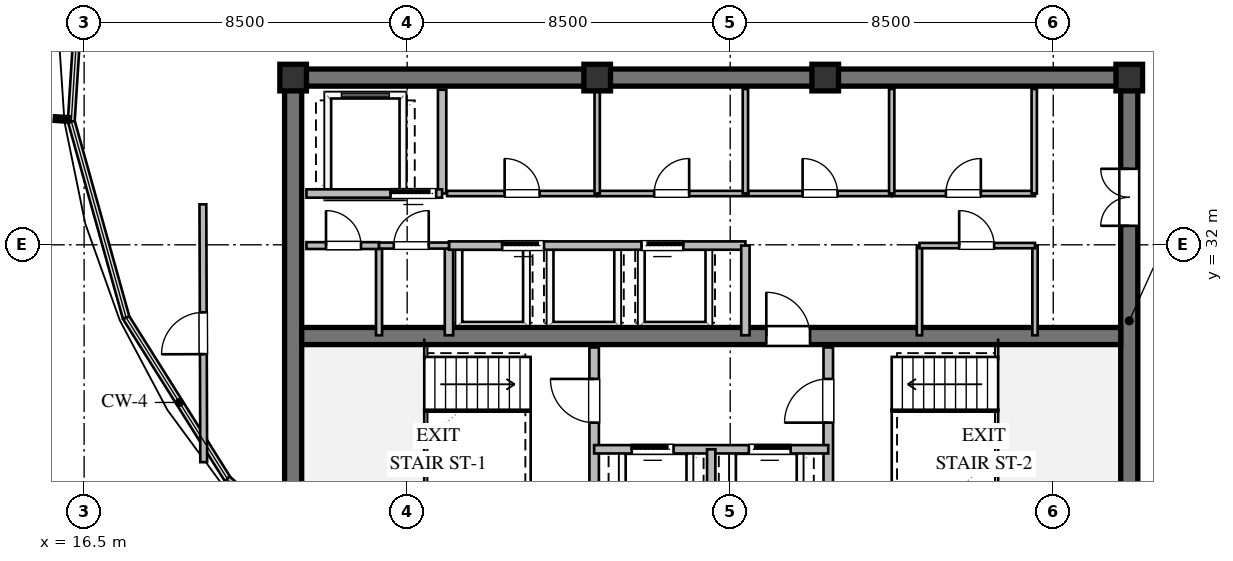
"""IFC4 building model, lengths in metres.
Left out: names, types, materials, properties, quantities, classifications, styles, units other than length and angle.
Written with IfcOpenShell. Run it as: python <this file> out.ifc"""

import sys

from ifc_helpers import new_model, si_unit, direction, frame, frame_2d, origin, origin_2d, place, context, subcontext, project, spatial, rectangle, extrude, element, fill, save


model = new_model("IFC4")
c1 = context("Model", 3, precision=1e-05, world=origin(), true_north=direction((0.0, 1.0)))
c2 = subcontext(c1, "Body", "Model", "MODEL_VIEW")
j1 = project(units=[si_unit("LENGTHUNIT", "METRE"), si_unit("PLANEANGLEUNIT", "RADIAN")], contexts=[c1])
p1 = place(None, origin())
s1 = spatial("IfcSite", under=j1, at=p1, CompositionType="ELEMENT")
p2 = place(p1, origin())
s2 = spatial("IfcBuilding", under=s1, at=p2, CompositionType="ELEMENT")
p3 = place(p2, frame((0.0, 0.0, 262.4)))
s3 = spatial("IfcBuildingStorey", under=s2, at=p3, CompositionType="ELEMENT", Elevation=262.4)
p4 = place(p3, frame((21.775, 36.4, 0.0), z_axis=(0.0, 0.0, 1.0), x_axis=(1.0, 0.0, 0.0)))
e1 = element("IfcWall", 1, at=p4, inside=s3, PredefinedType="SHEAR", context=c2, shape_type="SweptSolid", body=[
    extrude(rectangle(XDim=22.45, YDim=0.45, at=frame_2d((11.225, 0.0))), origin(), (0.0, 0.0, 1.0), 3.56),
])
p5 = place(p3, frame((22.0, 23.825, 0.0), z_axis=(0.0, 0.0, 1.0), x_axis=(0.0, 1.0, 0.0)))
e2 = element("IfcWall", 2, at=p5, inside=s3, PredefinedType="SHEAR", context=c2, shape_type="SweptSolid", body=[
    extrude(rectangle(XDim=12.35, YDim=0.45, at=frame_2d((6.175, 0.0))), origin(), (0.0, 0.0, 1.0), 3.56),
])
p6 = place(p3, frame((44.0, 23.825, 0.0), z_axis=(0.0, 0.0, 1.0), x_axis=(0.0, 1.0, 0.0)))
e3 = element("IfcWall", 3, at=p6, inside=s3, PredefinedType="SHEAR", context=c2, shape_type="SweptSolid", body=[
    extrude(rectangle(XDim=12.35, YDim=0.45, at=frame_2d((6.175, 0.0))), origin(), (0.0, 0.0, 1.0), 3.56),
])
p7 = place(p6, frame((8.675, 0.0, 0.0)))
e4 = element("IfcOpeningElement", 4, at=p7, cuts=e3, PredefinedType="OPENING", context=c2, shape_type="SweptSolid", body=[
    extrude(rectangle(XDim=1.5, YDim=2.15, at=frame_2d((0.75, 1.075))), frame((0.0, 0.235, 0.0), z_axis=(0.0, -1.0, 0.0), x_axis=(1.0, 0.0, 0.0)), (0.0, 0.0, 1.0), 0.47),
])
p8 = place(p3, frame((22.225, 29.6, 0.0), z_axis=(0.0, 0.0, 1.0), x_axis=(1.0, 0.0, 0.0)))
e5 = element("IfcWall", 5, at=p8, inside=s3, PredefinedType="SHEAR", context=c2, shape_type="SweptSolid", body=[
    extrude(rectangle(XDim=21.55, YDim=0.45, at=frame_2d((10.775, 0.0))), origin(), (0.0, 0.0, 1.0), 3.56),
])
p9 = place(p8, frame((12.225, 0.0, 0.0)))
e6 = element("IfcOpeningElement", 6, at=p9, cuts=e5, PredefinedType="OPENING", context=c2, shape_type="SweptSolid", body=[
    extrude(rectangle(XDim=1.15, YDim=2.1, at=frame_2d((0.575, 1.05))), frame((0.0, 0.235, 0.0), z_axis=(0.0, -1.0, 0.0), x_axis=(1.0, 0.0, 0.0)), (0.0, 0.0, 1.0), 0.47),
])
for number, where, z_axis, x_axis in (
    (7, (44.0, 36.4, 0.0), (0.0, 0.0, 1.0), (1.0, 0.0, 0.0)),
    (8, (36.0, 36.4, 0.0), (0.0, 0.0, 1.0), (1.0, 0.0, 0.0)),
    (9, (30.0, 36.4, 0.0), (0.0, 0.0, 1.0), (1.0, 0.0, 0.0)),
    (10, (22.0, 36.4, 0.0), (0.0, 0.0, 1.0), (1.0, 0.0, 0.0)),
):
    element("IfcColumn", number, at=place(p3, frame(where, z_axis=z_axis, x_axis=x_axis)), inside=s3, PredefinedType="COLUMN", context=c2, shape_type="SweptSolid", body=[
        extrude(rectangle(XDim=0.7, YDim=0.7, at=origin_2d()), origin(), (0.0, 0.0, 1.0), 3.8),
    ])
p10 = place(p3, frame((24.648, 21.849, 0.0), z_axis=(0.0, 0.0, 1.0), x_axis=(-0.747068410291, 0.664747162721, 0.0)))
e11 = element("IfcWall", 11, at=p10, inside=s3, PredefinedType="STANDARD", context=c2, shape_type="SweptSolid", body=[
    extrude(rectangle(XDim=5.928, YDim=0.32, at=frame_2d((2.964, 0.0))), origin(), (0.0, 0.0, 1.0), 2.35),
])
p11 = place(p3, frame((29.92, 23.9, 0.0), z_axis=(0.0, 0.0, 1.0), x_axis=(0.0, 1.0, 0.0)))
e12 = element("IfcWall", 12, at=p11, inside=s3, PredefinedType="SOLIDWALL", context=c2, shape_type="SweptSolid", body=[
    extrude(rectangle(XDim=5.4, YDim=0.25, at=frame_2d((2.7, 0.0))), origin(), (0.0, 0.0, 1.0), 3.09),
])
p12 = place(p11, frame((3.421, 0.0, 0.0)))
e13 = element("IfcOpeningElement", 13, at=p12, cuts=e12, PredefinedType="OPENING", context=c2, shape_type="SweptSolid", body=[
    extrude(rectangle(XDim=1.15, YDim=2.1, at=frame_2d((0.575, 1.05))), frame((0.0, 0.135, 0.0), z_axis=(0.0, -1.0, 0.0), x_axis=(1.0, 0.0, 0.0)), (0.0, 0.0, 1.0), 0.27),
])
p13 = place(p3, frame((36.08, 23.9, 0.0), z_axis=(0.0, 0.0, 1.0), x_axis=(0.0, 1.0, 0.0)))
e14 = element("IfcWall", 14, at=p13, inside=s3, PredefinedType="SOLIDWALL", context=c2, shape_type="SweptSolid", body=[
    extrude(rectangle(XDim=5.4, YDim=0.25, at=frame_2d((2.7, 0.0))), origin(), (0.0, 0.0, 1.0), 3.56),
])
p14 = place(p13, frame((3.421, 0.0, 0.0)))
e15 = element("IfcOpeningElement", 15, at=p14, cuts=e14, PredefinedType="OPENING", context=c2, shape_type="SweptSolid", body=[
    extrude(rectangle(XDim=1.15, YDim=2.1, at=frame_2d((0.575, 1.05))), frame((0.0, 0.135, 0.0), z_axis=(0.0, -1.0, 0.0), x_axis=(1.0, 0.0, 0.0)), (0.0, 0.0, 1.0), 0.27),
])
p15 = place(p3, frame((29.92, 26.62, 0.0), z_axis=(0.0, 0.0, 1.0), x_axis=(1.0, 0.0, 0.0)))
e16 = element("IfcWall", 16, at=p15, inside=s3, PredefinedType="SOLIDWALL", context=c2, shape_type="SweptSolid", body=[
    extrude(rectangle(XDim=6.16, YDim=0.22, at=frame_2d((3.08, 0.0))), origin(), (0.0, 0.0, 1.0), 3.56),
])
p16 = place(p15, frame((0.99, 0.0, 0.0)))
e17 = element("IfcOpeningElement", 17, at=p16, cuts=e16, PredefinedType="OPENING", context=c2, shape_type="SweptSolid", body=[
    extrude(rectangle(XDim=1.1, YDim=2.1, at=frame_2d((0.55, 1.05))), frame((0.0, 0.12, 0.0), z_axis=(0.0, -1.0, 0.0), x_axis=(1.0, 0.0, 0.0)), (0.0, 0.0, 1.0), 0.24),
])
p17 = place(p15, frame((4.07, 0.0, 0.0)))
e18 = element("IfcOpeningElement", 18, at=p17, cuts=e16, PredefinedType="OPENING", context=c2, shape_type="SweptSolid", body=[
    extrude(rectangle(XDim=1.1, YDim=2.1, at=frame_2d((0.55, 1.05))), frame((0.0, 0.12, 0.0), z_axis=(0.0, -1.0, 0.0), x_axis=(1.0, 0.0, 0.0)), (0.0, 0.0, 1.0), 0.24),
])
p18 = place(p3, frame((33.0, 23.9, 0.0), z_axis=(0.0, 0.0, 1.0), x_axis=(0.0, 1.0, 0.0)))
e19 = element("IfcWall", 19, at=p18, inside=s3, PredefinedType="SOLIDWALL", context=c2, shape_type="SweptSolid", body=[
    extrude(rectangle(XDim=2.72, YDim=0.22, at=frame_2d((1.36, 0.0))), origin(), (0.0, 0.0, 1.0), 3.56),
])
p19 = place(p3, frame((25.92, 33.35, 0.0), z_axis=(0.0, 0.0, 1.0), x_axis=(0.0, 1.0, 0.0)))
e20 = element("IfcWall", 20, at=p19, inside=s3, PredefinedType="SOLIDWALL", context=c2, shape_type="SweptSolid", body=[
    extrude(rectangle(XDim=2.73, YDim=0.22, at=frame_2d((1.365, 0.0))), origin(), (0.0, 0.0, 1.0), 3.56),
])
p20 = place(p3, frame((22.35, 33.35, 0.0), z_axis=(0.0, 0.0, 1.0), x_axis=(1.0, 0.0, 0.0)))
e21 = element("IfcWall", 21, at=p20, inside=s3, PredefinedType="SOLIDWALL", context=c2, shape_type="SweptSolid", body=[
    extrude(rectangle(XDim=3.57, YDim=0.22, at=frame_2d((1.785, 0.0))), origin(), (0.0, 0.0, 1.0), 3.56),
])
p21 = place(p20, frame((2.213, 0.0, 0.0)))
e22 = element("IfcOpeningElement", 22, at=p21, cuts=e21, PredefinedType="OPENING", context=c2, shape_type="SweptSolid", body=[
    extrude(rectangle(XDim=1.2, YDim=2.1, at=frame_2d((0.6, 1.05))), frame((0.0, 0.12, 0.0), z_axis=(0.0, -1.0, 0.0), x_axis=(1.0, 0.0, 0.0)), (0.0, 0.0, 1.0), 0.24),
])
p22 = place(p3, frame((26.1, 29.62, 0.0), z_axis=(0.0, 0.0, 1.0), x_axis=(0.0, 1.0, 0.0)))
e23 = element("IfcWall", 23, at=p22, inside=s3, PredefinedType="SOLIDWALL", context=c2, shape_type="SweptSolid", body=[
    extrude(rectangle(XDim=2.36, YDim=0.22, at=frame_2d((1.18, 0.0))), origin(), (0.0, 0.0, 1.0), 3.56),
])
p23 = place(p3, frame((26.1, 31.98, 0.0), z_axis=(0.0, 0.0, 1.0), x_axis=(1.0, 0.0, 0.0)))
e24 = element("IfcWall", 24, at=p23, inside=s3, PredefinedType="SOLIDWALL", context=c2, shape_type="SweptSolid", body=[
    extrude(rectangle(XDim=7.8, YDim=0.22, at=frame_2d((3.9, 0.0))), origin(), (0.0, 0.0, 1.0), 3.56),
])
p24 = place(p23, frame((1.4, 0.0, 0.0)))
e25 = element("IfcOpeningElement", 25, at=p24, cuts=e24, PredefinedType="OPENING", context=c2, shape_type="SweptSolid", body=[
    extrude(rectangle(XDim=1.1, YDim=2.1, at=frame_2d((0.55, 1.05))), frame((0.0, 0.12, 0.0), z_axis=(0.0, -1.0, 0.0), x_axis=(1.0, 0.0, 0.0)), (0.0, 0.0, 1.0), 0.24),
])
p25 = place(p23, frame((5.066, 0.0, 0.0)))
e26 = element("IfcOpeningElement", 26, at=p25, cuts=e24, PredefinedType="OPENING", context=c2, shape_type="SweptSolid", body=[
    extrude(rectangle(XDim=1.1, YDim=2.1, at=frame_2d((0.55, 1.05))), frame((0.0, 0.12, 0.0), z_axis=(0.0, -1.0, 0.0), x_axis=(1.0, 0.0, 0.0)), (0.0, 0.0, 1.0), 0.24),
])
p26 = place(p3, frame((33.9, 29.62, 0.0), z_axis=(0.0, 0.0, 1.0), x_axis=(0.0, 1.0, 0.0)))
e27 = element("IfcWall", 27, at=p26, inside=s3, PredefinedType="SOLIDWALL", context=c2, shape_type="SweptSolid", body=[
    extrude(rectangle(XDim=2.36, YDim=0.22, at=frame_2d((1.18, 0.0))), origin(), (0.0, 0.0, 1.0), 3.56),
])
p27 = place(p3, frame((26.05, 33.35, 0.0), z_axis=(0.0, 0.0, 1.0), x_axis=(1.0, 0.0, 0.0)))
e28 = element("IfcWall", 28, at=p27, inside=s3, PredefinedType="PARTITIONING", context=c2, shape_type="SweptSolid", body=[
    extrude(rectangle(XDim=3.95, YDim=0.14, at=frame_2d((1.975, 0.0))), origin(), (0.0, 0.0, 1.0), 3.56),
])
p28 = place(p27, frame((1.515, 0.0, 0.0)))
e29 = element("IfcOpeningElement", 29, at=p28, cuts=e28, PredefinedType="OPENING", context=c2, shape_type="SweptSolid", body=[
    extrude(rectangle(XDim=0.92, YDim=2.1, at=frame_2d((0.46, 1.05))), frame((0.0, 0.08, 0.0), z_axis=(0.0, -1.0, 0.0), x_axis=(1.0, 0.0, 0.0)), (0.0, 0.0, 1.0), 0.16),
])
p29 = place(p3, frame((30.0, 33.35, 0.0), z_axis=(0.0, 0.0, 1.0), x_axis=(1.0, 0.0, 0.0)))
e30 = element("IfcWall", 30, at=p29, inside=s3, PredefinedType="PARTITIONING", context=c2, shape_type="SweptSolid", body=[
    extrude(rectangle(XDim=3.92, YDim=0.14, at=frame_2d((1.96, 0.0))), origin(), (0.0, 0.0, 1.0), 3.56),
])
p30 = place(p29, frame((1.5, 0.0, 0.0)))
e31 = element("IfcOpeningElement", 31, at=p30, cuts=e30, PredefinedType="OPENING", context=c2, shape_type="SweptSolid", body=[
    extrude(rectangle(XDim=0.92, YDim=2.1, at=frame_2d((0.46, 1.05))), frame((0.0, 0.08, 0.0), z_axis=(0.0, -1.0, 0.0), x_axis=(1.0, 0.0, 0.0)), (0.0, 0.0, 1.0), 0.16),
])
for number, where, z_axis, x_axis in (
    (32, (30.0, 33.35, 0.0), (0.0, 0.0, 1.0), (0.0, 1.0, 0.0)),
    (33, (33.9, 33.35, 0.0), (0.0, 0.0, 1.0), (0.0, 1.0, 0.0)),
):
    element("IfcWall", number, at=place(p3, frame(where, z_axis=z_axis, x_axis=x_axis)), inside=s3, PredefinedType="PARTITIONING", context=c2, shape_type="SweptSolid", body=[
        extrude(rectangle(XDim=2.75, YDim=0.14, at=frame_2d((1.375, 0.0))), origin(), (0.0, 0.0, 1.0), 3.56),
    ])
p31 = place(p3, frame((33.98, 33.35, 0.0), z_axis=(0.0, 0.0, 1.0), x_axis=(1.0, 0.0, 0.0)))
e34 = element("IfcWall", 34, at=p31, inside=s3, PredefinedType="PARTITIONING", context=c2, shape_type="SweptSolid", body=[
    extrude(rectangle(XDim=3.77, YDim=0.14, at=frame_2d((1.885, 0.0))), origin(), (0.0, 0.0, 1.0), 3.56),
])
p32 = place(p31, frame((1.425, 0.0, 0.0)))
e35 = element("IfcOpeningElement", 35, at=p32, cuts=e34, PredefinedType="OPENING", context=c2, shape_type="SweptSolid", body=[
    extrude(rectangle(XDim=0.92, YDim=2.1, at=frame_2d((0.46, 1.05))), frame((0.0, 0.08, 0.0), z_axis=(0.0, -1.0, 0.0), x_axis=(1.0, 0.0, 0.0)), (0.0, 0.0, 1.0), 0.16),
])
p33 = place(p3, frame((37.75, 33.35, 0.0), z_axis=(0.0, 0.0, 1.0), x_axis=(1.0, 0.0, 0.0)))
e36 = element("IfcWall", 36, at=p33, inside=s3, PredefinedType="PARTITIONING", context=c2, shape_type="SweptSolid", body=[
    extrude(rectangle(XDim=3.77, YDim=0.14, at=frame_2d((1.885, 0.0))), origin(), (0.0, 0.0, 1.0), 3.56),
])
p34 = place(p33, frame((1.425, 0.0, 0.0)))
e37 = element("IfcOpeningElement", 37, at=p34, cuts=e36, PredefinedType="OPENING", context=c2, shape_type="SweptSolid", body=[
    extrude(rectangle(XDim=0.92, YDim=2.1, at=frame_2d((0.46, 1.05))), frame((0.0, 0.08, 0.0), z_axis=(0.0, -1.0, 0.0), x_axis=(1.0, 0.0, 0.0)), (0.0, 0.0, 1.0), 0.16),
])
for number, where, z_axis, x_axis in (
    (38, (37.75, 33.35, 0.0), (0.0, 0.0, 1.0), (0.0, 1.0, 0.0)),
    (39, (41.5, 33.35, 0.0), (0.0, 0.0, 1.0), (0.0, 1.0, 0.0)),
):
    element("IfcWall", number, at=place(p3, frame(where, z_axis=z_axis, x_axis=x_axis)), inside=s3, PredefinedType="PARTITIONING", context=c2, shape_type="SweptSolid", body=[
        extrude(rectangle(XDim=2.75, YDim=0.14, at=frame_2d((1.375, 0.0))), origin(), (0.0, 0.0, 1.0), 3.56),
    ])
p35 = place(p3, frame((24.26, 29.62, 0.0), z_axis=(0.0, 0.0, 1.0), x_axis=(0.0, 1.0, 0.0)))
e40 = element("IfcWall", 40, at=p35, inside=s3, PredefinedType="PLUMBINGWALL", context=c2, shape_type="SweptSolid", body=[
    extrude(rectangle(XDim=2.36, YDim=0.16, at=frame_2d((1.18, 0.0))), origin(), (0.0, 0.0, 1.0), 3.56),
])
p36 = place(p3, frame((22.35, 31.98, 0.0), z_axis=(0.0, 0.0, 1.0), x_axis=(1.0, 0.0, 0.0)))
e41 = element("IfcWall", 41, at=p36, inside=s3, PredefinedType="PARTITIONING", context=c2, shape_type="SweptSolid", body=[
    extrude(rectangle(XDim=1.91, YDim=0.18, at=frame_2d((0.955, 0.0))), origin(), (0.0, 0.0, 1.0), 3.56),
])
p37 = place(p36, frame((0.515, 0.0, 0.0)))
e42 = element("IfcOpeningElement", 42, at=p37, cuts=e41, PredefinedType="OPENING", context=c2, shape_type="SweptSolid", body=[
    extrude(rectangle(XDim=0.92, YDim=2.1, at=frame_2d((0.46, 1.05))), frame((0.0, 0.1, 0.0), z_axis=(0.0, -1.0, 0.0), x_axis=(1.0, 0.0, 0.0)), (0.0, 0.0, 1.0), 0.2),
])
p38 = place(p3, frame((24.26, 31.98, 0.0), z_axis=(0.0, 0.0, 1.0), x_axis=(1.0, 0.0, 0.0)))
e43 = element("IfcWall", 43, at=p38, inside=s3, PredefinedType="PLUMBINGWALL", context=c2, shape_type="SweptSolid", body=[
    extrude(rectangle(XDim=1.84, YDim=0.16, at=frame_2d((0.92, 0.0))), origin(), (0.0, 0.0, 1.0), 3.56),
])
p39 = place(p38, frame((0.388, 0.0, 0.0)))
e44 = element("IfcOpeningElement", 44, at=p39, cuts=e43, PredefinedType="OPENING", context=c2, shape_type="SweptSolid", body=[
    extrude(rectangle(XDim=0.92, YDim=2.1, at=frame_2d((0.46, 1.05))), frame((0.0, 0.09, 0.0), z_axis=(0.0, -1.0, 0.0), x_axis=(1.0, 0.0, 0.0)), (0.0, 0.0, 1.0), 0.18),
])
for number, where, z_axis, x_axis in (
    (45, (38.48, 29.62, 0.0), (0.0, 0.0, 1.0), (0.0, 1.0, 0.0)),
    (46, (41.52, 29.62, 0.0), (0.0, 0.0, 1.0), (0.0, 1.0, 0.0)),
):
    element("IfcWall", number, at=place(p3, frame(where, z_axis=z_axis, x_axis=x_axis)), inside=s3, PredefinedType="PARTITIONING", context=c2, shape_type="SweptSolid", body=[
        extrude(rectangle(XDim=2.36, YDim=0.14, at=frame_2d((1.18, 0.0))), origin(), (0.0, 0.0, 1.0), 3.56),
    ])
p40 = place(p3, frame((38.48, 31.98, 0.0), z_axis=(0.0, 0.0, 1.0), x_axis=(1.0, 0.0, 0.0)))
e47 = element("IfcWall", 47, at=p40, inside=s3, PredefinedType="PARTITIONING", context=c2, shape_type="SweptSolid", body=[
    extrude(rectangle(XDim=3.04, YDim=0.14, at=frame_2d((1.52, 0.0))), origin(), (0.0, 0.0, 1.0), 3.56),
])
p41 = place(p40, frame((1.045, 0.0, 0.0)))
e48 = element("IfcOpeningElement", 48, at=p41, cuts=e47, PredefinedType="OPENING", context=c2, shape_type="SweptSolid", body=[
    extrude(rectangle(XDim=0.92, YDim=2.1, at=frame_2d((0.46, 1.05))), frame((0.0, 0.08, 0.0), z_axis=(0.0, -1.0, 0.0), x_axis=(1.0, 0.0, 0.0)), (0.0, 0.0, 1.0), 0.16),
])
p42 = place(p3, frame((19.647, 26.281, 0.0), z_axis=(0.0, 0.0, 1.0), x_axis=(-0.003238907688, 0.999994754725, 0.0)))
e49 = element("IfcWall", 49, at=p42, inside=s3, PredefinedType="PARTITIONING", context=c2, shape_type="SweptSolid", body=[
    extrude(rectangle(XDim=6.784, YDim=0.18, at=frame_2d((3.392, 0.0))), origin(), (0.0, 0.0, 1.0), 3.017),
])
p43 = place(p42, frame((2.842, 0.0, 0.0)))
e50 = element("IfcOpeningElement", 50, at=p43, cuts=e49, PredefinedType="OPENING", context=c2, shape_type="SweptSolid", body=[
    extrude(rectangle(XDim=1.1, YDim=2.1, at=frame_2d((0.55, 1.05))), frame((0.0, 0.1, 0.0), z_axis=(0.0, -1.0, 0.0), x_axis=(1.0, 0.0, 0.0)), (0.0, 0.0, 1.0), 0.2),
])
p44 = place(p12, origin())
e51 = element("IfcDoor", 51, at=p44, inside=s3, OperationType="SINGLE_SWING_RIGHT", PredefinedType="DOOR", context=c2, shape_type="SweptSolid", body=[
    extrude(rectangle(XDim=1.15, YDim=2.1, at=frame_2d((0.575, 1.05))), frame((0.0, 0.025, 0.0), z_axis=(0.0, -1.0, 0.0), x_axis=(1.0, 0.0, 0.0)), (0.0, 0.0, 1.0), 0.05),
])
fill(e13, e51)
p45 = place(p14, origin())
e52 = element("IfcDoor", 52, at=p45, inside=s3, OperationType="SINGLE_SWING_LEFT", PredefinedType="DOOR", context=c2, shape_type="SweptSolid", body=[
    extrude(rectangle(XDim=1.15, YDim=2.1, at=frame_2d((0.575, 1.05))), frame((0.0, 0.025, 0.0), z_axis=(0.0, -1.0, 0.0), x_axis=(1.0, 0.0, 0.0)), (0.0, 0.0, 1.0), 0.05),
])
fill(e15, e52)
p46 = place(p16, origin())
e53 = element("IfcDoor", 53, at=p46, inside=s3, OperationType="SLIDING_TO_LEFT", PredefinedType="DOOR", context=c2, shape_type="SweptSolid", body=[
    extrude(rectangle(XDim=1.1, YDim=2.1, at=frame_2d((0.55, 1.05))), frame((0.0, 0.025, 0.0), z_axis=(0.0, -1.0, 0.0), x_axis=(1.0, 0.0, 0.0)), (0.0, 0.0, 1.0), 0.05),
])
fill(e17, e53)
p47 = place(p17, origin())
e54 = element("IfcDoor", 54, at=p47, inside=s3, OperationType="SLIDING_TO_RIGHT", PredefinedType="DOOR", context=c2, shape_type="SweptSolid", body=[
    extrude(rectangle(XDim=1.1, YDim=2.1, at=frame_2d((0.55, 1.05))), frame((0.0, 0.025, 0.0), z_axis=(0.0, -1.0, 0.0), x_axis=(1.0, 0.0, 0.0)), (0.0, 0.0, 1.0), 0.05),
])
fill(e18, e54)
p48 = place(p9, origin())
e55 = element("IfcDoor", 55, at=p48, inside=s3, OperationType="SINGLE_SWING_LEFT", PredefinedType="DOOR", context=c2, shape_type="SweptSolid", body=[
    extrude(rectangle(XDim=1.15, YDim=2.1, at=frame_2d((0.575, 1.05))), frame((0.0, 0.025, 0.0), z_axis=(0.0, -1.0, 0.0), x_axis=(1.0, 0.0, 0.0)), (0.0, 0.0, 1.0), 0.05),
])
fill(e6, e55)
p49 = place(p7, origin())
e56 = element("IfcDoor", 56, at=p49, inside=s3, OperationType="DOUBLE_DOOR_SINGLE_SWING", PredefinedType="DOOR", context=c2, shape_type="SweptSolid", body=[
    extrude(rectangle(XDim=1.5, YDim=2.15, at=frame_2d((0.75, 1.075))), frame((0.0, 0.025, 0.0), z_axis=(0.0, -1.0, 0.0), x_axis=(1.0, 0.0, 0.0)), (0.0, 0.0, 1.0), 0.05),
])
fill(e4, e56)
p50 = place(p21, origin())
e57 = element("IfcDoor", 57, at=p50, inside=s3, OperationType="SLIDING_TO_LEFT", PredefinedType="DOOR", context=c2, shape_type="SweptSolid", body=[
    extrude(rectangle(XDim=1.2, YDim=2.1, at=frame_2d((0.6, 1.05))), frame((0.0, 0.025, 0.0), z_axis=(0.0, -1.0, 0.0), x_axis=(1.0, 0.0, 0.0)), (0.0, 0.0, 1.0), 0.05),
])
fill(e22, e57)
p51 = place(p24, origin())
e58 = element("IfcDoor", 58, at=p51, inside=s3, OperationType="SLIDING_TO_LEFT", PredefinedType="DOOR", context=c2, shape_type="SweptSolid", body=[
    extrude(rectangle(XDim=1.1, YDim=2.1, at=frame_2d((0.55, 1.05))), frame((0.0, 0.025, 0.0), z_axis=(0.0, -1.0, 0.0), x_axis=(1.0, 0.0, 0.0)), (0.0, 0.0, 1.0), 0.05),
])
fill(e25, e58)
p52 = place(p25, origin())
e59 = element("IfcDoor", 59, at=p52, inside=s3, OperationType="SLIDING_TO_RIGHT", PredefinedType="DOOR", context=c2, shape_type="SweptSolid", body=[
    extrude(rectangle(XDim=1.1, YDim=2.1, at=frame_2d((0.55, 1.05))), frame((0.0, 0.025, 0.0), z_axis=(0.0, -1.0, 0.0), x_axis=(1.0, 0.0, 0.0)), (0.0, 0.0, 1.0), 0.05),
])
fill(e26, e59)
p53 = place(p28, origin())
e60 = element("IfcDoor", 60, at=p53, inside=s3, OperationType="SINGLE_SWING_LEFT", PredefinedType="DOOR", context=c2, shape_type="SweptSolid", body=[
    extrude(rectangle(XDim=0.92, YDim=2.1, at=frame_2d((0.46, 1.05))), frame((0.0, 0.025, 0.0), z_axis=(0.0, -1.0, 0.0), x_axis=(1.0, 0.0, 0.0)), (0.0, 0.0, 1.0), 0.05),
])
fill(e29, e60)
p54 = place(p30, origin())
e61 = element("IfcDoor", 61, at=p54, inside=s3, OperationType="SINGLE_SWING_RIGHT", PredefinedType="DOOR", context=c2, shape_type="SweptSolid", body=[
    extrude(rectangle(XDim=0.92, YDim=2.1, at=frame_2d((0.46, 1.05))), frame((0.0, 0.025, 0.0), z_axis=(0.0, -1.0, 0.0), x_axis=(1.0, 0.0, 0.0)), (0.0, 0.0, 1.0), 0.05),
])
fill(e31, e61)
p55 = place(p32, origin())
e62 = element("IfcDoor", 62, at=p55, inside=s3, OperationType="SINGLE_SWING_LEFT", PredefinedType="DOOR", context=c2, shape_type="SweptSolid", body=[
    extrude(rectangle(XDim=0.92, YDim=2.1, at=frame_2d((0.46, 1.05))), frame((0.0, 0.025, 0.0), z_axis=(0.0, -1.0, 0.0), x_axis=(1.0, 0.0, 0.0)), (0.0, 0.0, 1.0), 0.05),
])
fill(e35, e62)
p56 = place(p34, origin())
e63 = element("IfcDoor", 63, at=p56, inside=s3, OperationType="SINGLE_SWING_RIGHT", PredefinedType="DOOR", context=c2, shape_type="SweptSolid", body=[
    extrude(rectangle(XDim=0.92, YDim=2.1, at=frame_2d((0.46, 1.05))), frame((0.0, 0.025, 0.0), z_axis=(0.0, -1.0, 0.0), x_axis=(1.0, 0.0, 0.0)), (0.0, 0.0, 1.0), 0.05),
])
fill(e37, e63)
p57 = place(p37, origin())
e64 = element("IfcDoor", 64, at=p57, inside=s3, OperationType="SINGLE_SWING_LEFT", PredefinedType="DOOR", context=c2, shape_type="SweptSolid", body=[
    extrude(rectangle(XDim=0.92, YDim=2.1, at=frame_2d((0.46, 1.05))), frame((0.0, 0.025, 0.0), z_axis=(0.0, -1.0, 0.0), x_axis=(1.0, 0.0, 0.0)), (0.0, 0.0, 1.0), 0.05),
])
fill(e42, e64)
p58 = place(p39, origin())
e65 = element("IfcDoor", 65, at=p58, inside=s3, OperationType="SINGLE_SWING_RIGHT", PredefinedType="DOOR", context=c2, shape_type="SweptSolid", body=[
    extrude(rectangle(XDim=0.92, YDim=2.1, at=frame_2d((0.46, 1.05))), frame((0.0, 0.025, 0.0), z_axis=(0.0, -1.0, 0.0), x_axis=(1.0, 0.0, 0.0)), (0.0, 0.0, 1.0), 0.05),
])
fill(e44, e65)
p59 = place(p41, origin())
e66 = element("IfcDoor", 66, at=p59, inside=s3, OperationType="SINGLE_SWING_LEFT", PredefinedType="DOOR", context=c2, shape_type="SweptSolid", body=[
    extrude(rectangle(XDim=0.92, YDim=2.1, at=frame_2d((0.46, 1.05))), frame((0.0, 0.025, 0.0), z_axis=(0.0, -1.0, 0.0), x_axis=(1.0, 0.0, 0.0)), (0.0, 0.0, 1.0), 0.05),
])
fill(e48, e66)
p60 = place(p43, origin())
e67 = element("IfcDoor", 67, at=p60, inside=s3, OperationType="SINGLE_SWING_LEFT", PredefinedType="DOOR", context=c2, shape_type="SweptSolid", body=[
    extrude(rectangle(XDim=1.1, YDim=2.1, at=frame_2d((0.55, 1.05))), frame((0.0, 0.025, 0.0), z_axis=(0.0, -1.0, 0.0), x_axis=(1.0, 0.0, 0.0)), (0.0, 0.0, 1.0), 0.05),
])
fill(e50, e67)
save(model, sys.argv[1])
